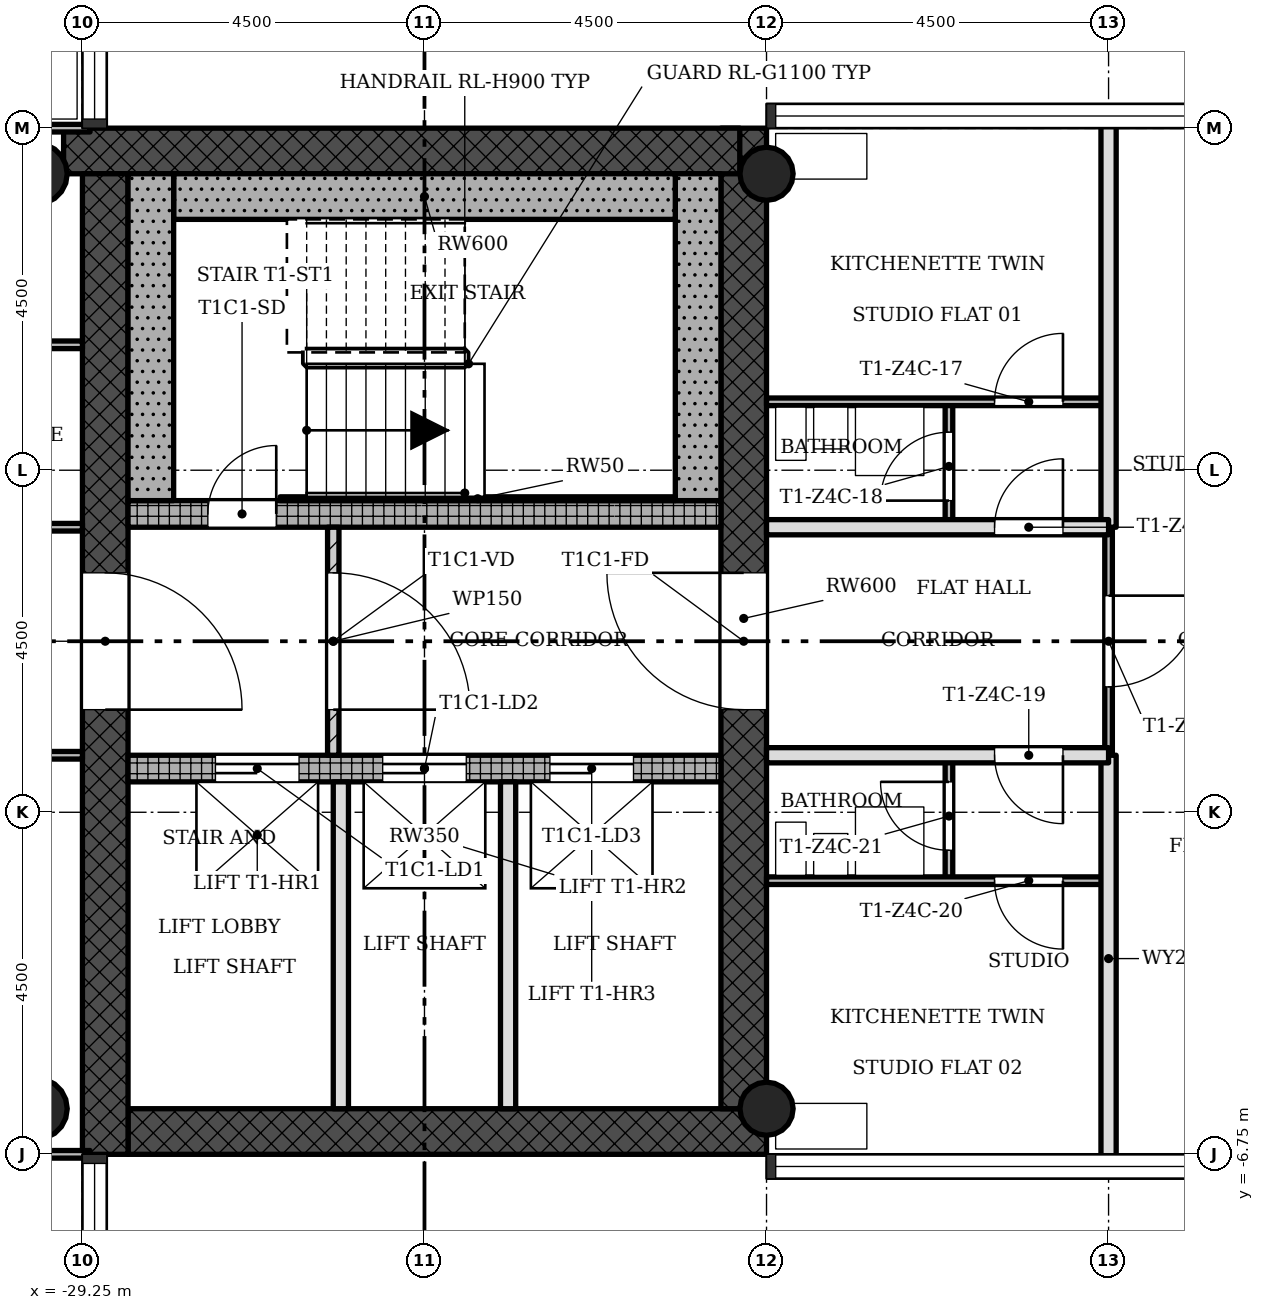
"""IFC4 building model, lengths in metres.
Left out: names, types, materials, properties, quantities, classifications, styles, units other than length and angle.
Written with IfcOpenShell. Run it as: python <this file> out.ifc"""

import sys

from ifc_helpers import new_model, si_unit, direction, frame, frame_2d, origin, origin_2d, place, context, subcontext, project, spatial, rectangle, hollow_circle, extrude, element, fill, save


model = new_model("IFC4")
c1 = context("Model", 3, precision=1e-05, world=origin(), true_north=direction((0.0, 1.0)))
c2 = subcontext(c1, "Body", "Model", "MODEL_VIEW")
j1 = project(units=[si_unit("LENGTHUNIT", "METRE"), si_unit("PLANEANGLEUNIT", "RADIAN")], contexts=[c1])
p1 = place(None, origin())
s1 = spatial("IfcSite", under=j1, at=p1, CompositionType="ELEMENT")
p2 = place(p1, origin())
s2 = spatial("IfcBuilding", under=s1, at=p2, CompositionType="ELEMENT")
p3 = place(p2, frame((0.0, 0.0, 185.8)))
s3 = spatial("IfcBuildingStorey", under=s2, at=p3, CompositionType="ELEMENT", Elevation=185.8)
p4 = place(p3, frame((-28.65, -6.45, 0.0), z_axis=(0.0, 0.0, 1.0), x_axis=(1.0, 0.0, 0.0)))
e1 = element("IfcWall", 1, at=p4, inside=s3, PredefinedType="SHEAR", context=c2, shape_type="SweptSolid", body=[
    extrude(rectangle(XDim=8.4, YDim=0.6, at=frame_2d((4.2, 0.0))), origin(), (0.0, 0.0, 1.0), 3.4),
])
p5 = place(p3, frame((-20.55, -6.15, 0.0), z_axis=(0.0, 0.0, 1.0), x_axis=(0.0, 1.0, 0.0)))
e2 = element("IfcWall", 2, at=p5, inside=s3, PredefinedType="SHEAR", context=c2, shape_type="SweptSolid", body=[
    extrude(rectangle(XDim=12.9, YDim=0.6, at=frame_2d((6.45, 0.0))), origin(), (0.0, 0.0, 1.0), 3.4),
])
p6 = place(p5, frame((5.25, 0.0, 0.0)))
e3 = element("IfcOpeningElement", 3, at=p6, cuts=e2, PredefinedType="OPENING", context=c2, shape_type="SweptSolid", body=[
    extrude(rectangle(XDim=1.8, YDim=2.1, at=frame_2d((0.9, 1.05))), frame((0.0, 0.31, 0.0), z_axis=(0.0, -1.0, 0.0), x_axis=(1.0, 0.0, 0.0)), (0.0, 0.0, 1.0), 0.62),
])
p7 = place(p3, frame((-20.602, 6.45, 0.0), z_axis=(0.0, 0.0, 1.0), x_axis=(-1.0, 0.0, 0.0)))
e4 = element("IfcWall", 4, at=p7, inside=s3, PredefinedType="SHEAR", context=c2, shape_type="SweptSolid", body=[
    extrude(rectangle(XDim=8.896, YDim=0.6, at=frame_2d((4.448, 0.0))), origin(), (0.0, 0.0, 1.0), 3.4),
])
p8 = place(p3, frame((-28.95, 6.15, 0.0), z_axis=(0.0, 0.0, 1.0), x_axis=(0.0, -1.0, 0.0)))
e5 = element("IfcWall", 5, at=p8, inside=s3, PredefinedType="SHEAR", context=c2, shape_type="SweptSolid", body=[
    extrude(rectangle(XDim=12.9, YDim=0.6, at=frame_2d((6.45, 0.0))), origin(), (0.0, 0.0, 1.0), 3.4),
])
p9 = place(p8, frame((5.25, 0.0, 0.0)))
e6 = element("IfcOpeningElement", 6, at=p9, cuts=e5, PredefinedType="OPENING", context=c2, shape_type="SweptSolid", body=[
    extrude(rectangle(XDim=1.8, YDim=2.1, at=frame_2d((0.9, 1.05))), frame((0.0, 0.31, 0.0), z_axis=(0.0, -1.0, 0.0), x_axis=(1.0, 0.0, 0.0)), (0.0, 0.0, 1.0), 0.62),
])
p10 = place(p3, frame((-28.65, -1.675, 0.0), z_axis=(0.0, 0.0, 1.0), x_axis=(1.0, 0.0, 0.0)))
e7 = element("IfcWall", 7, at=p10, inside=s3, PredefinedType="SHEAR", context=c2, shape_type="SweptSolid", body=[
    extrude(rectangle(XDim=7.8, YDim=0.35, at=frame_2d((3.9, 0.0))), origin(), (0.0, 0.0, 1.0), 3.4),
])
p11 = place(p10, frame((1.15, 0.0, 0.0)))
e8 = element("IfcOpeningElement", 8, at=p11, cuts=e7, PredefinedType="OPENING", context=c2, shape_type="SweptSolid", body=[
    extrude(rectangle(XDim=1.1, YDim=2.1, at=frame_2d((0.55, 1.05))), frame((0.0, 0.185, 0.0), z_axis=(0.0, -1.0, 0.0), x_axis=(1.0, 0.0, 0.0)), (0.0, 0.0, 1.0), 0.37),
])
p12 = place(p10, frame((3.35, 0.0, 0.0)))
e9 = element("IfcOpeningElement", 9, at=p12, cuts=e7, PredefinedType="OPENING", context=c2, shape_type="SweptSolid", body=[
    extrude(rectangle(XDim=1.1, YDim=2.1, at=frame_2d((0.55, 1.05))), frame((0.0, 0.185, 0.0), z_axis=(0.0, -1.0, 0.0), x_axis=(1.0, 0.0, 0.0)), (0.0, 0.0, 1.0), 0.37),
])
p13 = place(p10, frame((5.55, 0.0, 0.0)))
e10 = element("IfcOpeningElement", 10, at=p13, cuts=e7, PredefinedType="OPENING", context=c2, shape_type="SweptSolid", body=[
    extrude(rectangle(XDim=1.1, YDim=2.1, at=frame_2d((0.55, 1.05))), frame((0.0, 0.185, 0.0), z_axis=(0.0, -1.0, 0.0), x_axis=(1.0, 0.0, 0.0)), (0.0, 0.0, 1.0), 0.37),
])
p14 = place(p3, frame((-28.65, 1.675, 0.0), z_axis=(0.0, 0.0, 1.0), x_axis=(1.0, 0.0, 0.0)))
e11 = element("IfcWall", 11, at=p14, inside=s3, PredefinedType="SHEAR", context=c2, shape_type="SweptSolid", body=[
    extrude(rectangle(XDim=7.8, YDim=0.35, at=frame_2d((3.9, 0.0))), origin(), (0.0, 0.0, 1.0), 3.4),
])
p15 = place(p14, frame((1.05, 0.0, 0.0)))
e12 = element("IfcOpeningElement", 12, at=p15, cuts=e11, PredefinedType="OPENING", context=c2, shape_type="SweptSolid", body=[
    extrude(rectangle(XDim=0.9, YDim=2.1, at=frame_2d((0.45, 1.05))), frame((0.0, 0.185, 0.0), z_axis=(0.0, -1.0, 0.0), x_axis=(1.0, 0.0, 0.0)), (0.0, 0.0, 1.0), 0.37),
])
for number, where, z_axis, x_axis in (
    (13, (-20.25, -6.15, 0.0), (0.0, 0.0, 1.0), (1.0, 0.0, 0.0)),
    (14, (-20.25, 6.15, 0.0), (0.0, 0.0, 1.0), (1.0, 0.0, 0.0)),
):
    element("IfcColumn", number, at=place(p3, frame(where, z_axis=z_axis, x_axis=x_axis)), inside=s3, PredefinedType="COLUMN", context=c2, shape_type="SweptSolid", body=[
        extrude(hollow_circle(Radius=0.35, WallThickness=0.025, at=origin_2d()), origin(), (0.0, 0.0, 1.0), 3.4),
    ])
for number, where, z_axis, x_axis in (
    (15, (-29.85, -6.15, 0.0), (0.0, 0.0, 1.0), (1.0, 0.0, 0.0)),
    (16, (-29.85, 6.15, 0.0), (0.0, 0.0, 1.0), (1.0, 0.0, 0.0)),
):
    element("IfcColumn", number, at=place(p3, frame(where, z_axis=z_axis, x_axis=x_axis)), inside=s3, PredefinedType="COLUMN", context=c2, shape_type="SweptSolid", body=[
        extrude(hollow_circle(Radius=0.4, WallThickness=0.028, at=origin_2d()), origin(), (0.0, 0.0, 1.0), 3.4),
    ])
p16 = place(p3, frame((-25.95, -1.5, 0.0), z_axis=(0.0, 0.0, 1.0), x_axis=(0.0, 1.0, 0.0)))
e17 = element("IfcWall", 17, at=p16, inside=s3, PredefinedType="PARTITIONING", context=c2, shape_type="SweptSolid", body=[
    extrude(rectangle(XDim=3.0, YDim=0.15, at=frame_2d((1.5, 0.0))), origin(), (0.0, 0.0, 1.0), 3.0),
])
p17 = place(p16, frame((0.6, 0.0, 0.0)))
e18 = element("IfcOpeningElement", 18, at=p17, cuts=e17, PredefinedType="OPENING", context=c2, shape_type="SweptSolid", body=[
    extrude(rectangle(XDim=1.8, YDim=2.1, at=frame_2d((0.9, 1.05))), frame((0.0, 0.085, 0.0), z_axis=(0.0, -1.0, 0.0), x_axis=(1.0, 0.0, 0.0)), (0.0, 0.0, 1.0), 0.17),
])
for number, where, z_axis, x_axis in (
    (19, (-25.85, -6.15, 0.0), (0.0, 0.0, 1.0), (0.0, 1.0, 0.0)),
    (20, (-23.65, -6.15, 0.0), (0.0, 0.0, 1.0), (0.0, 1.0, 0.0)),
):
    element("IfcWall", number, at=place(p3, frame(where, z_axis=z_axis, x_axis=x_axis)), inside=s3, PredefinedType="SOLIDWALL", context=c2, shape_type="SweptSolid", body=[
        extrude(rectangle(XDim=4.3, YDim=0.2, at=frame_2d((2.15, 0.0))), origin(), (0.0, 0.0, 1.0), 3.0),
    ])
p18 = place(p3, frame((-17.85, -3.15, 0.0), z_axis=(0.0, 0.0, 1.0), x_axis=(0.0, 1.0, 0.0)))
e21 = element("IfcWall", 21, at=p18, inside=s3, PredefinedType="PARTITIONING", context=c2, shape_type="SweptSolid", body=[
    extrude(rectangle(XDim=1.65, YDim=0.1, at=frame_2d((0.825, 0.0))), origin(), (0.0, 0.0, 1.0), 3.0),
])
p19 = place(p18, frame((0.4, 0.0, 0.0)))
e22 = element("IfcOpeningElement", 22, at=p19, cuts=e21, PredefinedType="OPENING", context=c2, shape_type="SweptSolid", body=[
    extrude(rectangle(XDim=0.9, YDim=2.1, at=frame_2d((0.45, 1.05))), frame((0.0, 0.06, 0.0), z_axis=(0.0, -1.0, 0.0), x_axis=(1.0, 0.0, 0.0)), (0.0, 0.0, 1.0), 0.12),
])
p20 = place(p3, frame((-17.85, 1.5, 0.0), z_axis=(0.0, 0.0, 1.0), x_axis=(0.0, 1.0, 0.0)))
e23 = element("IfcWall", 23, at=p20, inside=s3, PredefinedType="PARTITIONING", context=c2, shape_type="SweptSolid", body=[
    extrude(rectangle(XDim=1.65, YDim=0.1, at=frame_2d((0.825, 0.0))), origin(), (0.0, 0.0, 1.0), 3.0),
])
p21 = place(p20, frame((0.35, 0.0, 0.0)))
e24 = element("IfcOpeningElement", 24, at=p21, cuts=e23, PredefinedType="OPENING", context=c2, shape_type="SweptSolid", body=[
    extrude(rectangle(XDim=0.9, YDim=2.1, at=frame_2d((0.45, 1.05))), frame((0.0, 0.06, 0.0), z_axis=(0.0, -1.0, 0.0), x_axis=(1.0, 0.0, 0.0)), (0.0, 0.0, 1.0), 0.12),
])
p22 = place(p3, frame((-15.75, -1.5, 0.0), z_axis=(0.0, 0.0, 1.0), x_axis=(0.0, 1.0, 0.0)))
e25 = element("IfcWall", 25, at=p22, inside=s3, PredefinedType="PARTITIONING", context=c2, shape_type="SweptSolid", body=[
    extrude(rectangle(XDim=3.0, YDim=0.1, at=frame_2d((1.5, 0.0))), origin(), (0.0, 0.0, 1.0), 3.0),
])
p23 = place(p22, frame((0.9, 0.0, 0.0)))
e26 = element("IfcOpeningElement", 26, at=p23, cuts=e25, PredefinedType="OPENING", context=c2, shape_type="SweptSolid", body=[
    extrude(rectangle(XDim=1.2, YDim=2.1, at=frame_2d((0.6, 1.05))), frame((0.0, 0.06, 0.0), z_axis=(0.0, -1.0, 0.0), x_axis=(1.0, 0.0, 0.0)), (0.0, 0.0, 1.0), 0.12),
])
for number, where, z_axis, x_axis in (
    (27, (-15.75, -6.85, 0.0), (0.0, 0.0, 1.0), (0.0, 1.0, 0.0)),
    (28, (-15.75, 1.5, 0.0), (0.0, 0.0, 1.0), (0.0, 1.0, 0.0)),
):
    element("IfcWall", number, at=place(p3, frame(where, z_axis=z_axis, x_axis=x_axis)), inside=s3, PredefinedType="SOLIDWALL", context=c2, shape_type="SweptSolid", body=[
        extrude(rectangle(XDim=5.35, YDim=0.2, at=frame_2d((2.675, 0.0))), origin(), (0.0, 0.0, 1.0), 3.0),
    ])
p24 = place(p3, frame((-35.1, -6.75, 0.0), z_axis=(0.0, 0.0, 1.0), x_axis=(1.0, 0.0, 0.0)))
e29 = element("IfcWall", 29, at=p24, inside=s3, PredefinedType="PARTITIONING", context=c2, shape_type="SweptSolid", body=[
    extrude(rectangle(XDim=5.95, YDim=0.1, at=frame_2d((2.975, 0.0))), origin(), (0.0, 0.0, 1.0), 3.0),
])
p25 = place(p3, frame((-20.25, -3.15, 0.0), z_axis=(0.0, 0.0, 1.0), x_axis=(1.0, 0.0, 0.0)))
e30 = element("IfcWall", 30, at=p25, inside=s3, PredefinedType="PARTITIONING", context=c2, shape_type="SweptSolid", body=[
    extrude(rectangle(XDim=4.5, YDim=0.1, at=frame_2d((2.25, 0.0))), origin(), (0.0, 0.0, 1.0), 3.0),
])
p26 = place(p25, frame((3.0, 0.0, 0.0)))
e31 = element("IfcOpeningElement", 31, at=p26, cuts=e30, PredefinedType="OPENING", context=c2, shape_type="SweptSolid", body=[
    extrude(rectangle(XDim=0.9, YDim=2.1, at=frame_2d((0.45, 1.05))), frame((0.0, 0.06, 0.0), z_axis=(0.0, -1.0, 0.0), x_axis=(1.0, 0.0, 0.0)), (0.0, 0.0, 1.0), 0.12),
])
p27 = place(p3, frame((-31.5, -1.5, 0.0), z_axis=(0.0, 0.0, 1.0), x_axis=(1.0, 0.0, 0.0)))
e32 = element("IfcWall", 32, at=p27, inside=s3, PredefinedType="PARTITIONING", context=c2, shape_type="SweptSolid", body=[
    extrude(rectangle(XDim=2.25, YDim=0.1, at=frame_2d((1.125, 0.0))), origin(), (0.0, 0.0, 1.0), 3.0),
])
p28 = place(p3, frame((-20.25, -1.5, 0.0), z_axis=(0.0, 0.0, 1.0), x_axis=(1.0, 0.0, 0.0)))
e33 = element("IfcWall", 33, at=p28, inside=s3, PredefinedType="SOLIDWALL", context=c2, shape_type="SweptSolid", body=[
    extrude(rectangle(XDim=4.5, YDim=0.2, at=frame_2d((2.25, 0.0))), origin(), (0.0, 0.0, 1.0), 3.0),
])
p29 = place(p28, frame((3.0, 0.0, 0.0)))
e34 = element("IfcOpeningElement", 34, at=p29, cuts=e33, PredefinedType="OPENING", context=c2, shape_type="SweptSolid", body=[
    extrude(rectangle(XDim=0.9, YDim=2.1, at=frame_2d((0.45, 1.05))), frame((0.0, 0.11, 0.0), z_axis=(0.0, -1.0, 0.0), x_axis=(1.0, 0.0, 0.0)), (0.0, 0.0, 1.0), 0.22),
])
p30 = place(p3, frame((-31.5, 1.5, 0.0), z_axis=(0.0, 0.0, 1.0), x_axis=(1.0, 0.0, 0.0)))
e35 = element("IfcWall", 35, at=p30, inside=s3, PredefinedType="PARTITIONING", context=c2, shape_type="SweptSolid", body=[
    extrude(rectangle(XDim=2.25, YDim=0.1, at=frame_2d((1.125, 0.0))), origin(), (0.0, 0.0, 1.0), 3.0),
])
p31 = place(p30, frame((0.675, 0.0, 0.0)))
e36 = element("IfcOpeningElement", 36, at=p31, cuts=e35, PredefinedType="OPENING", context=c2, shape_type="SweptSolid", body=[
    extrude(rectangle(XDim=0.9, YDim=2.1, at=frame_2d((0.45, 1.05))), frame((0.0, 0.06, 0.0), z_axis=(0.0, -1.0, 0.0), x_axis=(1.0, 0.0, 0.0)), (0.0, 0.0, 1.0), 0.12),
])
p32 = place(p3, frame((-20.25, 1.5, 0.0), z_axis=(0.0, 0.0, 1.0), x_axis=(1.0, 0.0, 0.0)))
e37 = element("IfcWall", 37, at=p32, inside=s3, PredefinedType="SOLIDWALL", context=c2, shape_type="SweptSolid", body=[
    extrude(rectangle(XDim=4.5, YDim=0.2, at=frame_2d((2.25, 0.0))), origin(), (0.0, 0.0, 1.0), 3.0),
])
p33 = place(p32, frame((3.0, 0.0, 0.0)))
e38 = element("IfcOpeningElement", 38, at=p33, cuts=e37, PredefinedType="OPENING", context=c2, shape_type="SweptSolid", body=[
    extrude(rectangle(XDim=0.9, YDim=2.1, at=frame_2d((0.45, 1.05))), frame((0.0, 0.11, 0.0), z_axis=(0.0, -1.0, 0.0), x_axis=(1.0, 0.0, 0.0)), (0.0, 0.0, 1.0), 0.22),
])
p34 = place(p3, frame((-20.25, 3.15, 0.0), z_axis=(0.0, 0.0, 1.0), x_axis=(1.0, 0.0, 0.0)))
e39 = element("IfcWall", 39, at=p34, inside=s3, PredefinedType="PARTITIONING", context=c2, shape_type="SweptSolid", body=[
    extrude(rectangle(XDim=4.5, YDim=0.1, at=frame_2d((2.25, 0.0))), origin(), (0.0, 0.0, 1.0), 3.0),
])
p35 = place(p34, frame((3.0, 0.0, 0.0)))
e40 = element("IfcOpeningElement", 40, at=p35, cuts=e39, PredefinedType="OPENING", context=c2, shape_type="SweptSolid", body=[
    extrude(rectangle(XDim=0.9, YDim=2.1, at=frame_2d((0.45, 1.05))), frame((0.0, 0.06, 0.0), z_axis=(0.0, -1.0, 0.0), x_axis=(1.0, 0.0, 0.0)), (0.0, 0.0, 1.0), 0.12),
])
p36 = place(p3, frame((-31.5, 3.9, 0.0), z_axis=(0.0, 0.0, 1.0), x_axis=(1.0, 0.0, 0.0)))
e41 = element("IfcWall", 41, at=p36, inside=s3, PredefinedType="PARTITIONING", context=c2, shape_type="SweptSolid", body=[
    extrude(rectangle(XDim=2.25, YDim=0.1, at=frame_2d((1.125, 0.0))), origin(), (0.0, 0.0, 1.0), 3.0),
])
p37 = place(p3, frame((-35.1, 6.75, 0.0), z_axis=(0.0, 0.0, 1.0), x_axis=(1.0, 0.0, 0.0)))
e42 = element("IfcWall", 42, at=p37, inside=s3, PredefinedType="PARTITIONING", context=c2, shape_type="SweptSolid", body=[
    extrude(rectangle(XDim=5.95, YDim=0.1, at=frame_2d((2.975, 0.0))), origin(), (0.0, 0.0, 1.0), 3.0),
])
p38 = place(p3, frame((-21.15, 1.85, 0.0), z_axis=(0.0, 0.0, 1.0), x_axis=(0.0, 1.0, 0.0)))
e43 = element("IfcWall", 43, at=p38, inside=s3, PredefinedType="SHEAR", context=c2, shape_type="SweptSolid", body=[
    extrude(rectangle(XDim=4.3, YDim=0.6, at=frame_2d((2.15, 0.0))), origin(), (0.0, 0.0, 1.0), 3.4),
])
p39 = place(p3, frame((-28.05, 5.85, 0.0), z_axis=(0.0, 0.0, 1.0), x_axis=(1.0, 0.0, 0.0)))
e44 = element("IfcWall", 44, at=p39, inside=s3, PredefinedType="SHEAR", context=c2, shape_type="SweptSolid", body=[
    extrude(rectangle(XDim=6.6, YDim=0.6, at=frame_2d((3.3, 0.0))), origin(), (0.0, 0.0, 1.0), 3.4),
])
p40 = place(p3, frame((-28.35, 1.85, 0.0), z_axis=(0.0, 0.0, 1.0), x_axis=(0.0, 1.0, 0.0)))
e45 = element("IfcWall", 45, at=p40, inside=s3, PredefinedType="SHEAR", context=c2, shape_type="SweptSolid", body=[
    extrude(rectangle(XDim=4.3, YDim=0.6, at=frame_2d((2.15, 0.0))), origin(), (0.0, 0.0, 1.0), 3.4),
])
p41 = place(p3, frame((-26.65, 1.875, 0.0), z_axis=(0.0, 0.0, 1.0), x_axis=(1.0, 0.0, 0.0)))
e46 = element("IfcWall", 46, at=p41, inside=s3, PredefinedType="SHEAR", context=c2, shape_type="SweptSolid", body=[
    extrude(rectangle(XDim=5.2, YDim=0.05, at=frame_2d((2.6, 0.0))), origin(), (0.0, 0.0, 1.0), 3.4),
])
p42 = place(p17, origin())
e47 = element("IfcDoor", 47, at=p42, inside=s3, OperationType="SINGLE_SWING_LEFT", PredefinedType="DOOR", context=c2, shape_type="SweptSolid", body=[
    extrude(rectangle(XDim=1.8, YDim=2.1, at=frame_2d((0.9, 1.05))), frame((0.0, 0.025, 0.0), z_axis=(0.0, -1.0, 0.0), x_axis=(1.0, 0.0, 0.0)), (0.0, 0.0, 1.0), 0.05),
])
fill(e18, e47)
p43 = place(p33, origin())
e48 = element("IfcDoor", 48, at=p43, inside=s3, OperationType="SINGLE_SWING_LEFT", PredefinedType="DOOR", context=c2, shape_type="SweptSolid", body=[
    extrude(rectangle(XDim=0.9, YDim=2.1, at=frame_2d((0.45, 1.05))), frame((0.0, 0.025, 0.0), z_axis=(0.0, -1.0, 0.0), x_axis=(1.0, 0.0, 0.0)), (0.0, 0.0, 1.0), 0.05),
])
fill(e38, e48)
p44 = place(p35, origin())
e49 = element("IfcDoor", 49, at=p44, inside=s3, OperationType="SINGLE_SWING_LEFT", PredefinedType="DOOR", context=c2, shape_type="SweptSolid", body=[
    extrude(rectangle(XDim=0.9, YDim=2.1, at=frame_2d((0.45, 1.05))), frame((0.0, 0.025, 0.0), z_axis=(0.0, -1.0, 0.0), x_axis=(1.0, 0.0, 0.0)), (0.0, 0.0, 1.0), 0.05),
])
fill(e40, e49)
p45 = place(p21, origin())
e50 = element("IfcDoor", 50, at=p45, inside=s3, OperationType="SINGLE_SWING_RIGHT", PredefinedType="DOOR", context=c2, shape_type="SweptSolid", body=[
    extrude(rectangle(XDim=0.9, YDim=2.1, at=frame_2d((0.45, 1.05))), frame((0.0, 0.025, 0.0), z_axis=(0.0, -1.0, 0.0), x_axis=(1.0, 0.0, 0.0)), (0.0, 0.0, 1.0), 0.05),
])
fill(e24, e50)
p46 = place(p29, origin())
e51 = element("IfcDoor", 51, at=p46, inside=s3, OperationType="SINGLE_SWING_RIGHT", PredefinedType="DOOR", context=c2, shape_type="SweptSolid", body=[
    extrude(rectangle(XDim=0.9, YDim=2.1, at=frame_2d((0.45, 1.05))), frame((0.0, 0.025, 0.0), z_axis=(0.0, -1.0, 0.0), x_axis=(1.0, 0.0, 0.0)), (0.0, 0.0, 1.0), 0.05),
])
fill(e34, e51)
p47 = place(p26, origin())
e52 = element("IfcDoor", 52, at=p47, inside=s3, OperationType="SINGLE_SWING_RIGHT", PredefinedType="DOOR", context=c2, shape_type="SweptSolid", body=[
    extrude(rectangle(XDim=0.9, YDim=2.1, at=frame_2d((0.45, 1.05))), frame((0.0, 0.025, 0.0), z_axis=(0.0, -1.0, 0.0), x_axis=(1.0, 0.0, 0.0)), (0.0, 0.0, 1.0), 0.05),
])
fill(e31, e52)
p48 = place(p19, origin())
e53 = element("IfcDoor", 53, at=p48, inside=s3, OperationType="SINGLE_SWING_LEFT", PredefinedType="DOOR", context=c2, shape_type="SweptSolid", body=[
    extrude(rectangle(XDim=0.9, YDim=2.1, at=frame_2d((0.45, 1.05))), frame((0.0, 0.025, 0.0), z_axis=(0.0, -1.0, 0.0), x_axis=(1.0, 0.0, 0.0)), (0.0, 0.0, 1.0), 0.05),
])
fill(e22, e53)
p49 = place(p23, origin())
e54 = element("IfcDoor", 54, at=p49, inside=s3, OperationType="SINGLE_SWING_RIGHT", PredefinedType="DOOR", context=c2, shape_type="SweptSolid", body=[
    extrude(rectangle(XDim=1.2, YDim=2.1, at=frame_2d((0.6, 1.05))), frame((0.0, 0.025, 0.0), z_axis=(0.0, -1.0, 0.0), x_axis=(1.0, 0.0, 0.0)), (0.0, 0.0, 1.0), 0.05),
])
fill(e26, e54)
p50 = place(p15, origin())
e55 = element("IfcDoor", 55, at=p50, inside=s3, OperationType="SINGLE_SWING_LEFT", PredefinedType="DOOR", context=c2, shape_type="SweptSolid", body=[
    extrude(rectangle(XDim=0.9, YDim=2.1, at=frame_2d((0.45, 1.05))), frame((0.0, 0.025, 0.0), z_axis=(0.0, -1.0, 0.0), x_axis=(1.0, 0.0, 0.0)), (0.0, 0.0, 1.0), 0.05),
])
fill(e12, e55)
p51 = place(p11, origin())
e56 = element("IfcDoor", 56, at=p51, inside=s3, OperationType="SLIDING_TO_LEFT", PredefinedType="DOOR", context=c2, shape_type="SweptSolid", body=[
    extrude(rectangle(XDim=1.1, YDim=2.1, at=frame_2d((0.55, 1.05))), frame((0.0, 0.025, 0.0), z_axis=(0.0, -1.0, 0.0), x_axis=(1.0, 0.0, 0.0)), (0.0, 0.0, 1.0), 0.05),
])
fill(e8, e56)
p52 = place(p12, origin())
e57 = element("IfcDoor", 57, at=p52, inside=s3, OperationType="SLIDING_TO_LEFT", PredefinedType="DOOR", context=c2, shape_type="SweptSolid", body=[
    extrude(rectangle(XDim=1.1, YDim=2.1, at=frame_2d((0.55, 1.05))), frame((0.0, 0.025, 0.0), z_axis=(0.0, -1.0, 0.0), x_axis=(1.0, 0.0, 0.0)), (0.0, 0.0, 1.0), 0.05),
])
fill(e9, e57)
p53 = place(p13, origin())
e58 = element("IfcDoor", 58, at=p53, inside=s3, OperationType="SLIDING_TO_LEFT", PredefinedType="DOOR", context=c2, shape_type="SweptSolid", body=[
    extrude(rectangle(XDim=1.1, YDim=2.1, at=frame_2d((0.55, 1.05))), frame((0.0, 0.025, 0.0), z_axis=(0.0, -1.0, 0.0), x_axis=(1.0, 0.0, 0.0)), (0.0, 0.0, 1.0), 0.05),
])
fill(e10, e58)
p54 = place(p9, origin())
e59 = element("IfcDoor", 59, at=p54, inside=s3, OperationType="SINGLE_SWING_LEFT", PredefinedType="DOOR", context=c2, shape_type="SweptSolid", body=[
    extrude(rectangle(XDim=1.8, YDim=2.1, at=frame_2d((0.9, 1.05))), frame((0.0, 0.025, 0.0), z_axis=(0.0, -1.0, 0.0), x_axis=(1.0, 0.0, 0.0)), (0.0, 0.0, 1.0), 0.05),
])
fill(e6, e59)
p55 = place(p6, origin())
e60 = element("IfcDoor", 60, at=p55, inside=s3, OperationType="SINGLE_SWING_LEFT", PredefinedType="DOOR", context=c2, shape_type="SweptSolid", body=[
    extrude(rectangle(XDim=1.8, YDim=2.1, at=frame_2d((0.9, 1.05))), frame((0.0, 0.025, 0.0), z_axis=(0.0, -1.0, 0.0), x_axis=(1.0, 0.0, 0.0)), (0.0, 0.0, 1.0), 0.05),
])
fill(e3, e60)
save(model, sys.argv[1])
